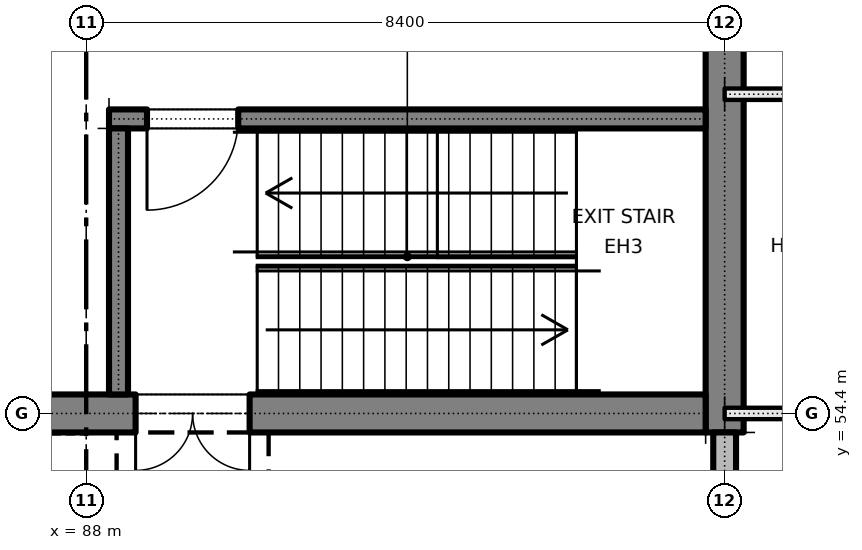
"""IFC4 building model, lengths in metres.
Left out: names, types, materials, properties, quantities, classifications, styles, units other than length and angle.
Written with IfcOpenShell. Run it as: python <this file> out.ifc"""

import sys

from ifc_helpers import new_model, si_unit, direction, frame, frame_2d, origin, place, context, subcontext, project, spatial, rectangle, extrude, element, fill, save


model = new_model("IFC4")
c1 = context("Model", 3, precision=1e-05, world=origin(), true_north=direction((0.0, 1.0)))
c2 = subcontext(c1, "Body", "Model", "MODEL_VIEW")
j1 = project(units=[si_unit("LENGTHUNIT", "METRE"), si_unit("PLANEANGLEUNIT", "RADIAN")], contexts=[c1])
p1 = place(None, origin())
s1 = spatial("IfcSite", under=j1, at=p1, CompositionType="ELEMENT")
p2 = place(p1, origin())
s2 = spatial("IfcBuilding", under=s1, at=p2, CompositionType="ELEMENT")
p3 = place(p2, origin())
s3 = spatial("IfcBuildingStorey", under=s2, at=p3, CompositionType="ELEMENT", Elevation=0.0)
p4 = place(p3, frame((96.4, 54.15, 0.0), z_axis=(0.0, 0.0, 1.0), x_axis=(0.0, 1.0, 0.0)))
e1 = element("IfcWall", 1, at=p4, inside=s3, PredefinedType="SOLIDWALL", context=c2, shape_type="SweptSolid", body=[
    extrude(rectangle(XDim=42.5, YDim=0.5, at=frame_2d((21.25, 0.0))), origin(), (0.0, 0.0, 1.0), 5.4),
])
p5 = place(p4, frame((8.35, 0.0, 0.0)))
e2 = element("IfcOpeningElement", 2, at=p5, cuts=e1, PredefinedType="OPENING", context=c2, shape_type="SweptSolid", body=[
    extrude(rectangle(XDim=1.8, YDim=2.1, at=frame_2d((0.9, 1.05))), frame((0.0, 0.26, 0.0), z_axis=(0.0, -1.0, 0.0), x_axis=(1.0, 0.0, 0.0)), (0.0, 0.0, 1.0), 0.52),
])
p6 = place(p4, frame((19.75, 0.0, 0.0)))
e3 = element("IfcOpeningElement", 3, at=p6, cuts=e1, PredefinedType="OPENING", context=c2, shape_type="SweptSolid", body=[
    extrude(rectangle(XDim=3.0, YDim=2.1, at=frame_2d((1.5, 1.05))), frame((0.0, 0.26, 0.0), z_axis=(0.0, -1.0, 0.0), x_axis=(1.0, 0.0, 0.0)), (0.0, 0.0, 1.0), 0.52),
])
p7 = place(p4, frame((32.35, 0.0, 0.0)))
e4 = element("IfcOpeningElement", 4, at=p7, cuts=e1, PredefinedType="OPENING", context=c2, shape_type="SweptSolid", body=[
    extrude(rectangle(XDim=1.8, YDim=2.1, at=frame_2d((0.9, 1.05))), frame((0.0, 0.26, 0.0), z_axis=(0.0, -1.0, 0.0), x_axis=(1.0, 0.0, 0.0)), (0.0, 0.0, 1.0), 0.52),
])
p8 = place(p3, frame((29.45, 54.4, 0.0), z_axis=(0.0, 0.0, 1.0), x_axis=(1.0, 0.0, 0.0)))
e5 = element("IfcWall", 5, at=p8, inside=s3, PredefinedType="SOLIDWALL", context=c2, shape_type="SweptSolid", body=[
    extrude(rectangle(XDim=66.7, YDim=0.5, at=frame_2d((33.35, 0.0))), origin(), (0.0, 0.0, 1.0), 5.4),
])
p9 = place(p8, frame((11.75, 0.0, 0.9)))
e6 = element("IfcOpeningElement", 6, at=p9, cuts=e5, PredefinedType="OPENING", context=c2, shape_type="SweptSolid", body=[
    extrude(rectangle(XDim=1.2, YDim=3.6, at=frame_2d((0.6, 1.8))), frame((0.0, 0.26, 0.0), z_axis=(0.0, -1.0, 0.0), x_axis=(1.0, 0.0, 0.0)), (0.0, 0.0, 1.0), 0.52),
])
p10 = place(p8, frame((20.15, 0.0, 0.9)))
e7 = element("IfcOpeningElement", 7, at=p10, cuts=e5, PredefinedType="OPENING", context=c2, shape_type="SweptSolid", body=[
    extrude(rectangle(XDim=1.2, YDim=3.6, at=frame_2d((0.6, 1.8))), frame((0.0, 0.26, 0.0), z_axis=(0.0, -1.0, 0.0), x_axis=(1.0, 0.0, 0.0)), (0.0, 0.0, 1.0), 0.52),
])
p11 = place(p8, frame((28.55, 0.0, 0.9)))
e8 = element("IfcOpeningElement", 8, at=p11, cuts=e5, PredefinedType="OPENING", context=c2, shape_type="SweptSolid", body=[
    extrude(rectangle(XDim=1.2, YDim=3.6, at=frame_2d((0.6, 1.8))), frame((0.0, 0.26, 0.0), z_axis=(0.0, -1.0, 0.0), x_axis=(1.0, 0.0, 0.0)), (0.0, 0.0, 1.0), 0.52),
])
p12 = place(p8, frame((36.95, 0.0, 0.9)))
e9 = element("IfcOpeningElement", 9, at=p12, cuts=e5, PredefinedType="OPENING", context=c2, shape_type="SweptSolid", body=[
    extrude(rectangle(XDim=1.2, YDim=3.6, at=frame_2d((0.6, 1.8))), frame((0.0, 0.26, 0.0), z_axis=(0.0, -1.0, 0.0), x_axis=(1.0, 0.0, 0.0)), (0.0, 0.0, 1.0), 0.52),
])
p13 = place(p8, frame((45.35, 0.0, 0.9)))
e10 = element("IfcOpeningElement", 10, at=p13, cuts=e5, PredefinedType="OPENING", context=c2, shape_type="SweptSolid", body=[
    extrude(rectangle(XDim=1.2, YDim=3.6, at=frame_2d((0.6, 1.8))), frame((0.0, 0.26, 0.0), z_axis=(0.0, -1.0, 0.0), x_axis=(1.0, 0.0, 0.0)), (0.0, 0.0, 1.0), 0.52),
])
p14 = place(p8, frame((53.75, 0.0, 0.9)))
e11 = element("IfcOpeningElement", 11, at=p14, cuts=e5, PredefinedType="OPENING", context=c2, shape_type="SweptSolid", body=[
    extrude(rectangle(XDim=1.2, YDim=3.6, at=frame_2d((0.6, 1.8))), frame((0.0, 0.26, 0.0), z_axis=(0.0, -1.0, 0.0), x_axis=(1.0, 0.0, 0.0)), (0.0, 0.0, 1.0), 0.52),
])
p15 = place(p8, frame((0.1, 0.0, 0.0)))
e12 = element("IfcOpeningElement", 12, at=p15, cuts=e5, PredefinedType="OPENING", context=c2, shape_type="SweptSolid", body=[
    extrude(rectangle(XDim=1.5, YDim=2.1, at=frame_2d((0.75, 1.05))), frame((0.0, 0.26, 0.0), z_axis=(0.0, -1.0, 0.0), x_axis=(1.0, 0.0, 0.0)), (0.0, 0.0, 1.0), 0.52),
])
p16 = place(p8, frame((59.2, 0.0, 0.0)))
e13 = element("IfcOpeningElement", 13, at=p16, cuts=e5, PredefinedType="OPENING", context=c2, shape_type="SweptSolid", body=[
    extrude(rectangle(XDim=1.5, YDim=2.1, at=frame_2d((0.75, 1.05))), frame((0.0, 0.26, 0.0), z_axis=(0.0, -1.0, 0.0), x_axis=(1.0, 0.0, 0.0)), (0.0, 0.0, 1.0), 0.52),
])
p17 = place(p3, frame((88.3, 58.275, 0.0), z_axis=(0.0, 0.0, 1.0), x_axis=(1.0, 0.0, 0.0)))
e14 = element("IfcWall", 14, at=p17, inside=s3, PredefinedType="SOLIDWALL", context=c2, shape_type="SweptSolid", body=[
    extrude(rectangle(XDim=7.85, YDim=0.25, at=frame_2d((3.925, 0.0))), origin(), (0.0, 0.0, 1.0), 5.4),
])
p18 = place(p17, frame((0.5, 0.0, 0.0)))
e15 = element("IfcOpeningElement", 15, at=p18, cuts=e14, PredefinedType="OPENING", context=c2, shape_type="SweptSolid", body=[
    extrude(rectangle(XDim=1.2, YDim=2.1, at=frame_2d((0.6, 1.05))), frame((0.0, 0.135, 0.0), z_axis=(0.0, -1.0, 0.0), x_axis=(1.0, 0.0, 0.0)), (0.0, 0.0, 1.0), 0.27),
])
p19 = place(p3, frame((88.425, 54.65, 0.0), z_axis=(0.0, 0.0, 1.0), x_axis=(0.0, 1.0, 0.0)))
e16 = element("IfcWall", 16, at=p19, inside=s3, PredefinedType="SOLIDWALL", context=c2, shape_type="SweptSolid", body=[
    extrude(rectangle(XDim=3.5, YDim=0.25, at=frame_2d((1.75, 0.0))), origin(), (0.0, 0.0, 1.0), 5.4),
])
p20 = place(p3, frame((96.4, 54.17, -0.3), z_axis=(0.0, 0.0, 1.0), x_axis=(0.0, 1.0, 0.0)))
e17 = element("IfcWall", 17, at=p20, inside=s3, PredefinedType="SOLIDWALL", context=c2, shape_type="SweptSolid", body=[
    extrude(rectangle(XDim=42.46, YDim=0.5, at=frame_2d((21.23, 0.0))), origin(), (0.0, 0.0, 1.0), 0.3),
])
p21 = place(p3, frame((29.45, 54.4, -0.5), z_axis=(0.0, 0.0, 1.0), x_axis=(1.0, 0.0, 0.0)))
e18 = element("IfcWall", 18, at=p21, inside=s3, PredefinedType="SOLIDWALL", context=c2, shape_type="SweptSolid", body=[
    extrude(rectangle(XDim=66.7, YDim=0.5, at=frame_2d((33.35, 0.0))), origin(), (0.0, 0.0, 1.0), 0.5),
])
p22 = place(p3, frame((88.32, 58.275, -0.5), z_axis=(0.0, 0.0, 1.0), x_axis=(1.0, 0.0, 0.0)))
e19 = element("IfcWall", 19, at=p22, inside=s3, PredefinedType="SOLIDWALL", context=c2, shape_type="SweptSolid", body=[
    extrude(rectangle(XDim=7.83, YDim=0.25, at=frame_2d((3.915, 0.0))), origin(), (0.0, 0.0, 1.0), 0.5),
])
p23 = place(p3, frame((88.425, 57.455, -0.5), z_axis=(0.0, 0.0, 1.0), x_axis=(0.0, 1.0, 0.0)))
e20 = element("IfcWall", 20, at=p23, inside=s3, PredefinedType="SOLIDWALL", context=c2, shape_type="SweptSolid", body=[
    extrude(rectangle(XDim=0.695, YDim=0.25, at=frame_2d((0.347, 0.0))), origin(), (0.0, 0.0, 1.0), 0.5),
])
p24 = place(p3, frame((88.425, 54.65, -0.5), z_axis=(0.0, 0.0, 1.0), x_axis=(0.0, 1.0, 0.0)))
e21 = element("IfcWall", 21, at=p24, inside=s3, PredefinedType="SOLIDWALL", context=c2, shape_type="SweptSolid", body=[
    extrude(rectangle(XDim=2.805, YDim=0.25, at=frame_2d((1.403, 0.0))), origin(), (0.0, 0.0, 1.0), 0.5),
])
p25 = place(p3, frame((96.4, 46.187, 0.0), z_axis=(0.0, 0.0, 1.0), x_axis=(0.0, 1.0, 0.0)))
e22 = element("IfcWall", 22, at=p25, inside=s3, PredefinedType="SOLIDWALL", context=c2, shape_type="SweptSolid", body=[
    extrude(rectangle(XDim=7.963, YDim=0.3, at=frame_2d((3.981, 0.0))), origin(), (0.0, 0.0, 1.0), 4.687),
])
p26 = place(p3, frame((96.4, 54.4, 0.0), z_axis=(0.0, 0.0, 1.0), x_axis=(1.0, 0.0, 0.0)))
e23 = element("IfcWall", 23, at=p26, inside=s3, PredefinedType="PARTITIONING", context=c2, shape_type="SweptSolid", body=[
    extrude(rectangle(XDim=8.392, YDim=0.15, at=frame_2d((4.196, 0.0))), origin(), (0.0, 0.0, 1.0), 4.608),
])
p27 = place(p3, frame((96.4, 58.6, 0.0), z_axis=(0.0, 0.0, 1.0), x_axis=(1.0, 0.0, 0.0)))
e24 = element("IfcWall", 24, at=p27, inside=s3, PredefinedType="PARTITIONING", context=c2, shape_type="SweptSolid", body=[
    extrude(rectangle(XDim=8.4, YDim=0.15, at=frame_2d((4.2, 0.0))), origin(), (0.0, 0.0, 1.0), 5.4),
])
p28 = place(p18, frame((1.2, 0.0, 0.0), z_axis=(0.0, 0.0, 1.0), x_axis=(-1.0, 0.0, 0.0)))
e25 = element("IfcDoor", 25, at=p28, inside=s3, OperationType="SINGLE_SWING_RIGHT", PredefinedType="DOOR", context=c2, shape_type="SweptSolid", body=[
    extrude(rectangle(XDim=1.2, YDim=2.1, at=frame_2d((0.6, 1.05))), frame((0.0, 0.025, 0.0), z_axis=(0.0, -1.0, 0.0), x_axis=(1.0, 0.0, 0.0)), (0.0, 0.0, 1.0), 0.05),
])
fill(e15, e25)
p29 = place(p16, frame((1.5, 0.0, 0.0), z_axis=(0.0, 0.0, 1.0), x_axis=(-1.0, 0.0, 0.0)))
e26 = element("IfcDoor", 26, at=p29, inside=s3, OperationType="DOUBLE_DOOR_SINGLE_SWING", PredefinedType="DOOR", context=c2, shape_type="SweptSolid", body=[
    extrude(rectangle(XDim=1.5, YDim=2.1, at=frame_2d((0.75, 1.05))), frame((0.0, 0.025, 0.0), z_axis=(0.0, -1.0, 0.0), x_axis=(1.0, 0.0, 0.0)), (0.0, 0.0, 1.0), 0.05),
])
fill(e13, e26)
save(model, sys.argv[1])
